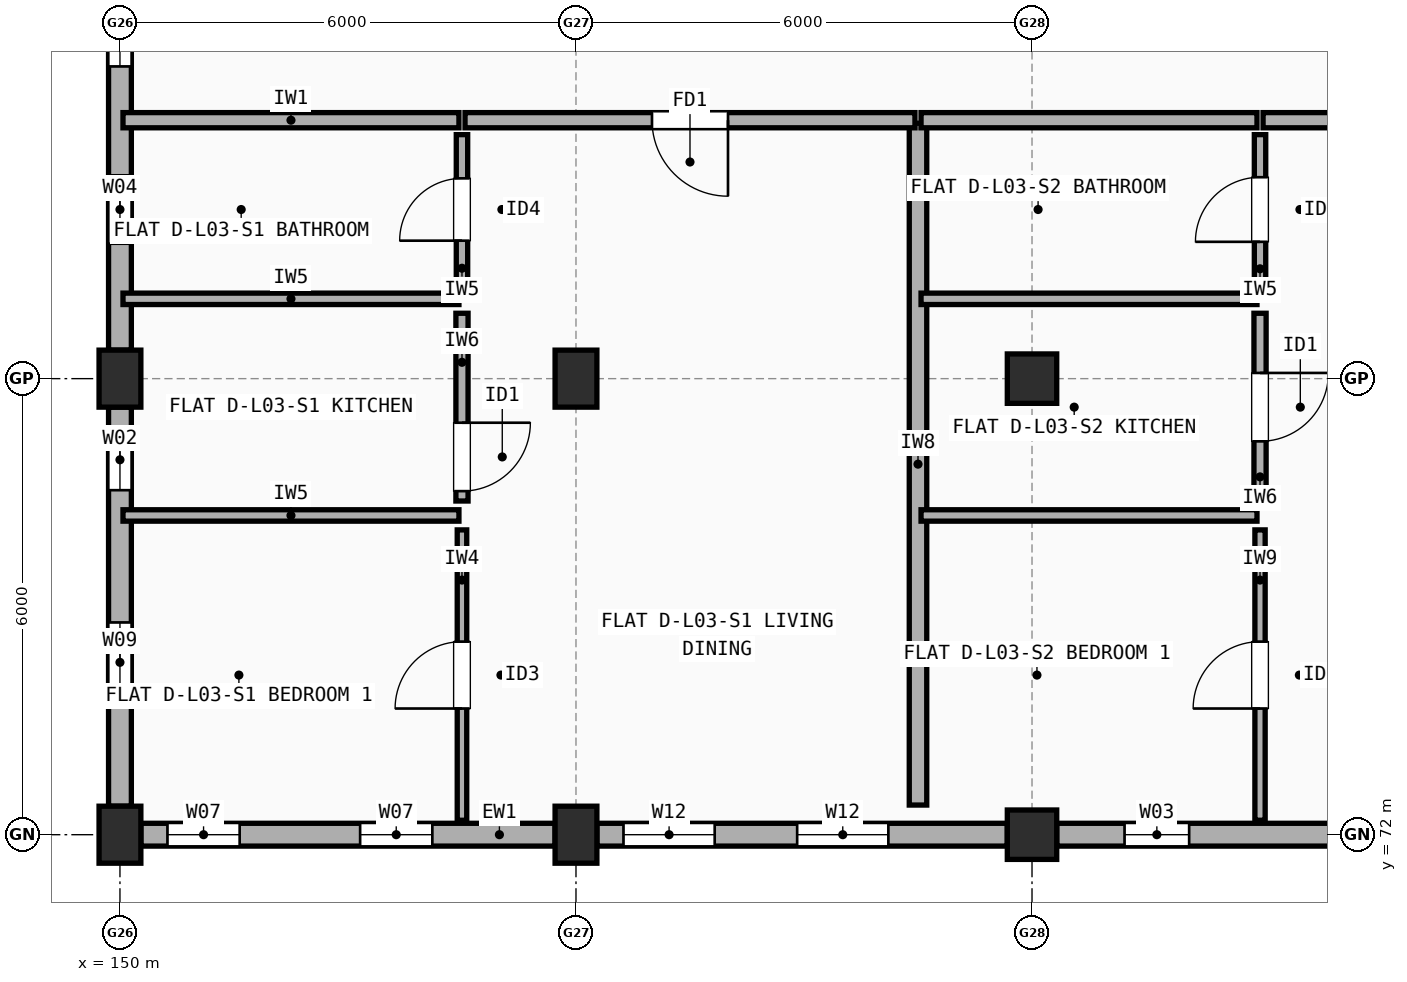
"""IFC4 building model, lengths in metres.
Left out: names, types, materials, properties, quantities, classifications, styles, units other than length and angle.
Written with IfcOpenShell. Run it as: python <this file> out.ifc"""

import sys

from ifc_helpers import new_model, si_unit, direction, frame, frame_2d, origin, origin_2d, place, context, subcontext, project, spatial, rectangle, extrude, element, fill, save


model = new_model("IFC4")
c1 = context("Model", 3, precision=1e-05, world=origin(), true_north=direction((0.0, 1.0)))
c2 = subcontext(c1, "Body", "Model", "MODEL_VIEW")
j1 = project(units=[si_unit("LENGTHUNIT", "METRE"), si_unit("PLANEANGLEUNIT", "RADIAN")], contexts=[c1])
p1 = place(None, origin())
s1 = spatial("IfcSite", under=j1, at=p1, CompositionType="ELEMENT")
p2 = place(p1, origin())
s2 = spatial("IfcBuilding", under=s1, at=p2, CompositionType="ELEMENT")
p3 = place(p2, frame((0.0, 0.0, 10.9)))
s3 = spatial("IfcBuildingStorey", under=s2, at=p3, CompositionType="ELEMENT", Elevation=10.9)
for number, where, z_axis, x_axis in (
    (1, (150.0, 72.0, 0.0), (0.0, 0.0, 1.0), (1.0, 0.0, 0.0)),
    (2, (150.0, 78.0, 0.0), (0.0, 0.0, 1.0), (1.0, 0.0, 0.0)),
    (3, (156.0, 72.0, 0.0), (0.0, 0.0, 1.0), (1.0, 0.0, 0.0)),
    (4, (156.0, 78.0, 0.0), (0.0, 0.0, 1.0), (1.0, 0.0, 0.0)),
):
    element("IfcColumn", number, at=place(p3, frame(where, z_axis=z_axis, x_axis=x_axis)), inside=s3, PredefinedType="COLUMN", context=c2, shape_type="SweptSolid", body=[
        extrude(rectangle(XDim=0.55, YDim=0.75, at=origin_2d()), origin(), (0.0, 0.0, 1.0), 2.96),
    ])
for number, where, z_axis, x_axis in (
    (5, (162.0, 72.0, 0.0), (0.0, 0.0, 1.0), (1.0, 0.0, 0.0)),
    (6, (162.0, 78.0, 0.0), (0.0, 0.0, 1.0), (1.0, 0.0, 0.0)),
):
    element("IfcColumn", number, at=place(p3, frame(where, z_axis=z_axis, x_axis=x_axis)), inside=s3, PredefinedType="COLUMN", context=c2, shape_type="SweptSolid", body=[
        extrude(rectangle(XDim=0.65, YDim=0.65, at=origin_2d()), origin(), (0.0, 0.0, 1.0), 2.96),
    ])
p4 = place(p3, frame((150.275, 72.0, 0.0), z_axis=(0.0, 0.0, 1.0), x_axis=(1.0, 0.0, 0.0)))
e7 = element("IfcWall", 7, at=p4, inside=s3, PredefinedType="STANDARD", context=c2, shape_type="SweptSolid", body=[
    extrude(rectangle(XDim=5.45, YDim=0.3, at=frame_2d((2.725, 0.0))), origin(), (0.0, 0.0, 1.0), 2.442),
])
p5 = place(p4, frame((0.35, 0.0, 0.9)))
e8 = element("IfcOpeningElement", 8, at=p5, cuts=e7, PredefinedType="OPENING", context=c2, shape_type="SweptSolid", body=[
    extrude(rectangle(XDim=0.95, YDim=1.35, at=frame_2d((0.475, 0.675))), frame((0.0, 0.16, 0.0), z_axis=(0.0, -1.0, 0.0), x_axis=(1.0, 0.0, 0.0)), (0.0, 0.0, 1.0), 0.32),
])
p6 = place(p4, frame((2.885, 0.0, 0.9)))
e9 = element("IfcOpeningElement", 9, at=p6, cuts=e7, PredefinedType="OPENING", context=c2, shape_type="SweptSolid", body=[
    extrude(rectangle(XDim=0.95, YDim=1.35, at=frame_2d((0.475, 0.675))), frame((0.0, 0.16, 0.0), z_axis=(0.0, -1.0, 0.0), x_axis=(1.0, 0.0, 0.0)), (0.0, 0.0, 1.0), 0.32),
])
p7 = place(p3, frame((156.275, 72.0, 0.0), z_axis=(0.0, 0.0, 1.0), x_axis=(1.0, 0.0, 0.0)))
e10 = element("IfcWall", 10, at=p7, inside=s3, PredefinedType="STANDARD", context=c2, shape_type="SweptSolid", body=[
    extrude(rectangle(XDim=5.4, YDim=0.3, at=frame_2d((2.7, 0.0))), origin(), (0.0, 0.0, 1.0), 2.442),
])
p8 = place(p7, frame((0.35, 0.0, 0.9)))
e11 = element("IfcOpeningElement", 11, at=p8, cuts=e10, PredefinedType="OPENING", context=c2, shape_type="SweptSolid", body=[
    extrude(rectangle(XDim=1.2, YDim=1.35, at=frame_2d((0.6, 0.675))), frame((0.0, 0.16, 0.0), z_axis=(0.0, -1.0, 0.0), x_axis=(1.0, 0.0, 0.0)), (0.0, 0.0, 1.0), 0.32),
])
p9 = place(p7, frame((2.635, 0.0, 0.9)))
e12 = element("IfcOpeningElement", 12, at=p9, cuts=e10, PredefinedType="OPENING", context=c2, shape_type="SweptSolid", body=[
    extrude(rectangle(XDim=1.2, YDim=1.35, at=frame_2d((0.6, 0.675))), frame((0.0, 0.16, 0.0), z_axis=(0.0, -1.0, 0.0), x_axis=(1.0, 0.0, 0.0)), (0.0, 0.0, 1.0), 0.32),
])
p10 = place(p3, frame((162.325, 72.0, 0.0), z_axis=(0.0, 0.0, 1.0), x_axis=(1.0, 0.0, 0.0)))
e13 = element("IfcWall", 13, at=p10, inside=s3, PredefinedType="STANDARD", context=c2, shape_type="SweptSolid", body=[
    extrude(rectangle(XDim=5.35, YDim=0.3, at=frame_2d((2.675, 0.0))), origin(), (0.0, 0.0, 1.0), 2.442),
])
p11 = place(p10, frame((0.893, 0.0, 0.9)))
e14 = element("IfcOpeningElement", 14, at=p11, cuts=e13, PredefinedType="OPENING", context=c2, shape_type="SweptSolid", body=[
    extrude(rectangle(XDim=0.85, YDim=1.25, at=frame_2d((0.425, 0.625))), frame((0.0, 0.16, 0.0), z_axis=(0.0, -1.0, 0.0), x_axis=(1.0, 0.0, 0.0)), (0.0, 0.0, 1.0), 0.32),
])
p12 = place(p10, frame((3.583, 0.0, 0.9)))
e15 = element("IfcOpeningElement", 15, at=p12, cuts=e13, PredefinedType="OPENING", context=c2, shape_type="SweptSolid", body=[
    extrude(rectangle(XDim=0.9, YDim=1.3, at=frame_2d((0.45, 0.65))), frame((0.0, 0.16, 0.0), z_axis=(0.0, -1.0, 0.0), x_axis=(1.0, 0.0, 0.0)), (0.0, 0.0, 1.0), 0.32),
])
p13 = place(p3, frame((150.0, 83.625, 0.0), z_axis=(0.0, 0.0, 1.0), x_axis=(0.0, -1.0, 0.0)))
e16 = element("IfcWall", 16, at=p13, inside=s3, PredefinedType="STANDARD", context=c2, shape_type="SweptSolid", body=[
    extrude(rectangle(XDim=5.25, YDim=0.3, at=frame_2d((2.625, 0.0))), origin(), (0.0, 0.0, 1.0), 2.442),
])
p14 = place(p13, frame((0.667, 0.0, 0.9)))
e17 = element("IfcOpeningElement", 17, at=p14, cuts=e16, PredefinedType="OPENING", context=c2, shape_type="SweptSolid", body=[
    extrude(rectangle(XDim=0.85, YDim=1.25, at=frame_2d((0.425, 0.625))), frame((0.0, 0.16, 0.0), z_axis=(0.0, -1.0, 0.0), x_axis=(1.0, 0.0, 0.0)), (0.0, 0.0, 1.0), 0.32),
])
p15 = place(p13, frame((2.95, 0.0, 0.9)))
e18 = element("IfcOpeningElement", 18, at=p15, cuts=e16, PredefinedType="OPENING", context=c2, shape_type="SweptSolid", body=[
    extrude(rectangle(XDim=0.9, YDim=1.3, at=frame_2d((0.45, 0.65))), frame((0.0, 0.16, 0.0), z_axis=(0.0, -1.0, 0.0), x_axis=(1.0, 0.0, 0.0)), (0.0, 0.0, 1.0), 0.32),
])
p16 = place(p3, frame((150.0, 77.625, 0.0), z_axis=(0.0, 0.0, 1.0), x_axis=(0.0, -1.0, 0.0)))
e19 = element("IfcWall", 19, at=p16, inside=s3, PredefinedType="STANDARD", context=c2, shape_type="SweptSolid", body=[
    extrude(rectangle(XDim=5.25, YDim=0.3, at=frame_2d((2.625, 0.0))), origin(), (0.0, 0.0, 1.0), 2.442),
])
p17 = place(p16, frame((0.292, 0.0, 0.9)))
e20 = element("IfcOpeningElement", 20, at=p17, cuts=e19, PredefinedType="OPENING", context=c2, shape_type="SweptSolid", body=[
    extrude(rectangle(XDim=0.8, YDim=1.2, at=frame_2d((0.4, 0.6))), frame((0.0, 0.16, 0.0), z_axis=(0.0, -1.0, 0.0), x_axis=(1.0, 0.0, 0.0)), (0.0, 0.0, 1.0), 0.32),
])
p18 = place(p16, frame((2.833, 0.0, 0.9)))
e21 = element("IfcOpeningElement", 21, at=p18, cuts=e19, PredefinedType="OPENING", context=c2, shape_type="SweptSolid", body=[
    extrude(rectangle(XDim=1.05, YDim=1.35, at=frame_2d((0.525, 0.675))), frame((0.0, 0.16, 0.0), z_axis=(0.0, -1.0, 0.0), x_axis=(1.0, 0.0, 0.0)), (0.0, 0.0, 1.0), 0.32),
])
p19 = place(p3, frame((160.5, 72.39, 0.0), z_axis=(0.0, 0.0, 1.0), x_axis=(0.0, 1.0, 0.0)))
e22 = element("IfcWall", 22, at=p19, inside=s3, PredefinedType="SOLIDWALL", context=c2, shape_type="SweptSolid", body=[
    extrude(rectangle(XDim=8.97, YDim=0.23, at=frame_2d((4.485, 0.0))), origin(), (0.0, 0.0, 1.0), 2.442),
])
p20 = place(p3, frame((150.04, 81.4, 0.0), z_axis=(0.0, 0.0, 1.0), x_axis=(1.0, 0.0, 0.0)))
e23 = element("IfcWall", 23, at=p20, inside=s3, PredefinedType="SOLIDWALL", context=c2, shape_type="SweptSolid", body=[
    extrude(rectangle(XDim=4.42, YDim=0.2, at=frame_2d((2.21, 0.0))), origin(), (0.0, 0.0, 1.0), 2.442),
])
p21 = place(p3, frame((154.54, 81.4, 0.0), z_axis=(0.0, 0.0, 1.0), x_axis=(1.0, 0.0, 0.0)))
e24 = element("IfcWall", 24, at=p21, inside=s3, PredefinedType="SOLIDWALL", context=c2, shape_type="SweptSolid", body=[
    extrude(rectangle(XDim=5.92, YDim=0.2, at=frame_2d((2.96, 0.0))), origin(), (0.0, 0.0, 1.0), 2.442),
])
p22 = place(p21, frame((2.46, 0.0, 0.0)))
e25 = element("IfcOpeningElement", 25, at=p22, cuts=e24, PredefinedType="OPENING", context=c2, shape_type="SweptSolid", body=[
    extrude(rectangle(XDim=1.0, YDim=2.15, at=frame_2d((0.5, 1.075))), frame((0.0, 0.11, 0.0), z_axis=(0.0, -1.0, 0.0), x_axis=(1.0, 0.0, 0.0)), (0.0, 0.0, 1.0), 0.22),
])
p23 = place(p3, frame((154.5, 72.19, 0.0), z_axis=(0.0, 0.0, 1.0), x_axis=(0.0, 1.0, 0.0)))
e26 = element("IfcWall", 26, at=p23, inside=s3, PredefinedType="PARTITIONING", context=c2, shape_type="SweptSolid", body=[
    extrude(rectangle(XDim=3.82, YDim=0.125, at=frame_2d((1.91, 0.0))), origin(), (0.0, 0.0, 1.0), 2.96),
])
p24 = place(p23, frame((1.47, 0.0, 0.0)))
e27 = element("IfcOpeningElement", 27, at=p24, cuts=e26, PredefinedType="OPENING", context=c2, shape_type="SweptSolid", body=[
    extrude(rectangle(XDim=0.88, YDim=2.1, at=frame_2d((0.44, 1.05))), frame((0.0, 0.073, 0.0), z_axis=(0.0, -1.0, 0.0), x_axis=(1.0, 0.0, 0.0)), (0.0, 0.0, 1.0), 0.145),
])
p25 = place(p3, frame((154.5, 76.39, 0.0), z_axis=(0.0, 0.0, 1.0), x_axis=(0.0, 1.0, 0.0)))
e28 = element("IfcWall", 28, at=p25, inside=s3, PredefinedType="PLUMBINGWALL", context=c2, shape_type="SweptSolid", body=[
    extrude(rectangle(XDim=2.47, YDim=0.16, at=frame_2d((1.235, 0.0))), origin(), (0.0, 0.0, 1.0), 2.442),
])
p26 = place(p25, frame((0.13, 0.0, 0.0)))
e29 = element("IfcOpeningElement", 29, at=p26, cuts=e28, PredefinedType="OPENING", context=c2, shape_type="SweptSolid", body=[
    extrude(rectangle(XDim=0.9, YDim=2.1, at=frame_2d((0.45, 1.05))), frame((0.0, 0.09, 0.0), z_axis=(0.0, -1.0, 0.0), x_axis=(1.0, 0.0, 0.0)), (0.0, 0.0, 1.0), 0.18),
])
p27 = place(p3, frame((154.5, 79.24, 0.0), z_axis=(0.0, 0.0, 1.0), x_axis=(0.0, 1.0, 0.0)))
e30 = element("IfcWall", 30, at=p27, inside=s3, PredefinedType="PARTITIONING", context=c2, shape_type="SweptSolid", body=[
    extrude(rectangle(XDim=1.97, YDim=0.15, at=frame_2d((0.985, 0.0))), origin(), (0.0, 0.0, 1.0), 2.96),
])
p28 = place(p27, frame((0.575, 0.0, 0.0)))
e31 = element("IfcOpeningElement", 31, at=p28, cuts=e30, PredefinedType="OPENING", context=c2, shape_type="SweptSolid", body=[
    extrude(rectangle(XDim=0.82, YDim=2.08, at=frame_2d((0.41, 1.04))), frame((0.0, 0.085, 0.0), z_axis=(0.0, -1.0, 0.0), x_axis=(1.0, 0.0, 0.0)), (0.0, 0.0, 1.0), 0.17),
])
for number, where, z_axis, x_axis in (
    (32, (150.04, 76.2, 0.0), (0.0, 0.0, 1.0), (1.0, 0.0, 0.0)),
    (33, (150.04, 79.05, 0.0), (0.0, 0.0, 1.0), (1.0, 0.0, 0.0)),
):
    element("IfcWall", number, at=place(p3, frame(where, z_axis=z_axis, x_axis=x_axis)), inside=s3, PredefinedType="PARTITIONING", context=c2, shape_type="SweptSolid", body=[
        extrude(rectangle(XDim=4.42, YDim=0.15, at=frame_2d((2.21, 0.0))), origin(), (0.0, 0.0, 1.0), 2.442),
    ])
p29 = place(p3, frame((160.54, 81.4, 0.0), z_axis=(0.0, 0.0, 1.0), x_axis=(1.0, 0.0, 0.0)))
e34 = element("IfcWall", 34, at=p29, inside=s3, PredefinedType="SOLIDWALL", context=c2, shape_type="SweptSolid", body=[
    extrude(rectangle(XDim=4.42, YDim=0.2, at=frame_2d((2.21, 0.0))), origin(), (0.0, 0.0, 1.0), 2.508),
])
p30 = place(p3, frame((165.04, 81.4, 0.0), z_axis=(0.0, 0.0, 1.0), x_axis=(1.0, 0.0, 0.0)))
e35 = element("IfcWall", 35, at=p30, inside=s3, PredefinedType="SOLIDWALL", context=c2, shape_type="SweptSolid", body=[
    extrude(rectangle(XDim=4.42, YDim=0.2, at=frame_2d((2.21, 0.0))), origin(), (0.0, 0.0, 1.0), 2.458),
])
p31 = place(p30, frame((1.72, 0.0, 0.0)))
e36 = element("IfcOpeningElement", 36, at=p31, cuts=e35, PredefinedType="OPENING", context=c2, shape_type="SweptSolid", body=[
    extrude(rectangle(XDim=0.98, YDim=2.15, at=frame_2d((0.49, 1.075))), frame((0.0, 0.11, 0.0), z_axis=(0.0, -1.0, 0.0), x_axis=(1.0, 0.0, 0.0)), (0.0, 0.0, 1.0), 0.22),
])
p32 = place(p3, frame((165.0, 72.19, 0.0), z_axis=(0.0, 0.0, 1.0), x_axis=(0.0, 1.0, 0.0)))
e37 = element("IfcWall", 37, at=p32, inside=s3, PredefinedType="PARTITIONING", context=c2, shape_type="SweptSolid", body=[
    extrude(rectangle(XDim=3.82, YDim=0.135, at=frame_2d((1.91, 0.0))), origin(), (0.0, 0.0, 1.0), 2.96),
])
p33 = place(p32, frame((1.47, 0.0, 0.0)))
e38 = element("IfcOpeningElement", 38, at=p33, cuts=e37, PredefinedType="OPENING", context=c2, shape_type="SweptSolid", body=[
    extrude(rectangle(XDim=0.88, YDim=2.1, at=frame_2d((0.44, 1.05))), frame((0.0, 0.077, 0.0), z_axis=(0.0, -1.0, 0.0), x_axis=(1.0, 0.0, 0.0)), (0.0, 0.0, 1.0), 0.155),
])
p34 = place(p3, frame((165.0, 76.39, 0.0), z_axis=(0.0, 0.0, 1.0), x_axis=(0.0, 1.0, 0.0)))
e39 = element("IfcWall", 39, at=p34, inside=s3, PredefinedType="PLUMBINGWALL", context=c2, shape_type="SweptSolid", body=[
    extrude(rectangle(XDim=2.47, YDim=0.16, at=frame_2d((1.235, 0.0))), origin(), (0.0, 0.0, 1.0), 2.442),
])
p35 = place(p34, frame((0.785, 0.0, 0.0)))
e40 = element("IfcOpeningElement", 40, at=p35, cuts=e39, PredefinedType="OPENING", context=c2, shape_type="SweptSolid", body=[
    extrude(rectangle(XDim=0.9, YDim=2.1, at=frame_2d((0.45, 1.05))), frame((0.0, 0.09, 0.0), z_axis=(0.0, -1.0, 0.0), x_axis=(1.0, 0.0, 0.0)), (0.0, 0.0, 1.0), 0.18),
])
p36 = place(p3, frame((165.0, 79.24, 0.0), z_axis=(0.0, 0.0, 1.0), x_axis=(0.0, 1.0, 0.0)))
e41 = element("IfcWall", 41, at=p36, inside=s3, PredefinedType="PARTITIONING", context=c2, shape_type="SweptSolid", body=[
    extrude(rectangle(XDim=1.97, YDim=0.15, at=frame_2d((0.985, 0.0))), origin(), (0.0, 0.0, 1.0), 2.96),
])
p37 = place(p36, frame((0.56, 0.0, 0.0)))
e42 = element("IfcOpeningElement", 42, at=p37, cuts=e41, PredefinedType="OPENING", context=c2, shape_type="SweptSolid", body=[
    extrude(rectangle(XDim=0.85, YDim=2.1, at=frame_2d((0.425, 1.05))), frame((0.0, 0.085, 0.0), z_axis=(0.0, -1.0, 0.0), x_axis=(1.0, 0.0, 0.0)), (0.0, 0.0, 1.0), 0.17),
])
p38 = place(p3, frame((160.54, 76.2, 0.0), z_axis=(0.0, 0.0, 1.0), x_axis=(1.0, 0.0, 0.0)))
e43 = element("IfcWall", 43, at=p38, inside=s3, PredefinedType="PARTITIONING", context=c2, shape_type="SweptSolid", body=[
    extrude(rectangle(XDim=4.42, YDim=0.15, at=frame_2d((2.21, 0.0))), origin(), (0.0, 0.0, 1.0), 2.548),
])
p39 = place(p3, frame((160.54, 79.05, 0.0), z_axis=(0.0, 0.0, 1.0), x_axis=(1.0, 0.0, 0.0)))
e44 = element("IfcWall", 44, at=p39, inside=s3, PredefinedType="PARTITIONING", context=c2, shape_type="SweptSolid", body=[
    extrude(rectangle(XDim=4.42, YDim=0.15, at=frame_2d((2.21, 0.0))), origin(), (0.0, 0.0, 1.0), 2.508),
])
p40 = place(p5, origin())
e45 = element("IfcWindow", 45, at=p40, inside=s3, PartitioningType="SINGLE_PANEL", PredefinedType="WINDOW", context=c2, shape_type="SweptSolid", body=[
    extrude(rectangle(XDim=0.95, YDim=1.35, at=frame_2d((0.475, 0.675))), frame((0.0, 0.03, 0.0), z_axis=(0.0, -1.0, 0.0), x_axis=(1.0, 0.0, 0.0)), (0.0, 0.0, 1.0), 0.06),
])
fill(e8, e45)
p41 = place(p6, origin())
e46 = element("IfcWindow", 46, at=p41, inside=s3, PartitioningType="SINGLE_PANEL", PredefinedType="WINDOW", context=c2, shape_type="SweptSolid", body=[
    extrude(rectangle(XDim=0.95, YDim=1.35, at=frame_2d((0.475, 0.675))), frame((0.0, 0.03, 0.0), z_axis=(0.0, -1.0, 0.0), x_axis=(1.0, 0.0, 0.0)), (0.0, 0.0, 1.0), 0.06),
])
fill(e9, e46)
p42 = place(p8, origin())
e47 = element("IfcWindow", 47, at=p42, inside=s3, PartitioningType="SINGLE_PANEL", PredefinedType="WINDOW", context=c2, shape_type="SweptSolid", body=[
    extrude(rectangle(XDim=1.2, YDim=1.35, at=frame_2d((0.6, 0.675))), frame((0.0, 0.03, 0.0), z_axis=(0.0, -1.0, 0.0), x_axis=(1.0, 0.0, 0.0)), (0.0, 0.0, 1.0), 0.06),
])
fill(e11, e47)
p43 = place(p9, origin())
e48 = element("IfcWindow", 48, at=p43, inside=s3, PartitioningType="SINGLE_PANEL", PredefinedType="WINDOW", context=c2, shape_type="SweptSolid", body=[
    extrude(rectangle(XDim=1.2, YDim=1.35, at=frame_2d((0.6, 0.675))), frame((0.0, 0.03, 0.0), z_axis=(0.0, -1.0, 0.0), x_axis=(1.0, 0.0, 0.0)), (0.0, 0.0, 1.0), 0.06),
])
fill(e12, e48)
p44 = place(p11, origin())
e49 = element("IfcWindow", 49, at=p44, inside=s3, PartitioningType="SINGLE_PANEL", PredefinedType="WINDOW", context=c2, shape_type="SweptSolid", body=[
    extrude(rectangle(XDim=0.85, YDim=1.25, at=frame_2d((0.425, 0.625))), frame((0.0, 0.03, 0.0), z_axis=(0.0, -1.0, 0.0), x_axis=(1.0, 0.0, 0.0)), (0.0, 0.0, 1.0), 0.06),
])
fill(e14, e49)
p45 = place(p14, origin())
e50 = element("IfcWindow", 50, at=p45, inside=s3, PartitioningType="SINGLE_PANEL", PredefinedType="WINDOW", context=c2, shape_type="SweptSolid", body=[
    extrude(rectangle(XDim=0.85, YDim=1.25, at=frame_2d((0.425, 0.625))), frame((0.0, 0.03, 0.0), z_axis=(0.0, -1.0, 0.0), x_axis=(1.0, 0.0, 0.0)), (0.0, 0.0, 1.0), 0.06),
])
fill(e17, e50)
p46 = place(p15, origin())
e51 = element("IfcWindow", 51, at=p46, inside=s3, PartitioningType="SINGLE_PANEL", PredefinedType="WINDOW", context=c2, shape_type="SweptSolid", body=[
    extrude(rectangle(XDim=0.9, YDim=1.3, at=frame_2d((0.45, 0.65))), frame((0.0, 0.03, 0.0), z_axis=(0.0, -1.0, 0.0), x_axis=(1.0, 0.0, 0.0)), (0.0, 0.0, 1.0), 0.06),
])
fill(e18, e51)
p47 = place(p17, origin())
e52 = element("IfcWindow", 52, at=p47, inside=s3, PartitioningType="SINGLE_PANEL", PredefinedType="WINDOW", context=c2, shape_type="SweptSolid", body=[
    extrude(rectangle(XDim=0.8, YDim=1.2, at=frame_2d((0.4, 0.6))), frame((0.0, 0.03, 0.0), z_axis=(0.0, -1.0, 0.0), x_axis=(1.0, 0.0, 0.0)), (0.0, 0.0, 1.0), 0.06),
])
fill(e20, e52)
p48 = place(p18, origin())
e53 = element("IfcWindow", 53, at=p48, inside=s3, PartitioningType="SINGLE_PANEL", PredefinedType="WINDOW", context=c2, shape_type="SweptSolid", body=[
    extrude(rectangle(XDim=1.05, YDim=1.35, at=frame_2d((0.525, 0.675))), frame((0.0, 0.03, 0.0), z_axis=(0.0, -1.0, 0.0), x_axis=(1.0, 0.0, 0.0)), (0.0, 0.0, 1.0), 0.06),
])
fill(e21, e53)
p49 = place(p22, origin())
e54 = element("IfcDoor", 54, at=p49, inside=s3, OperationType="SINGLE_SWING_RIGHT", PredefinedType="DOOR", context=c2, shape_type="SweptSolid", body=[
    extrude(rectangle(XDim=1.0, YDim=2.15, at=frame_2d((0.5, 1.075))), frame((0.0, 0.025, 0.0), z_axis=(0.0, -1.0, 0.0), x_axis=(1.0, 0.0, 0.0)), (0.0, 0.0, 1.0), 0.05),
])
fill(e25, e54)
p50 = place(p24, origin())
e55 = element("IfcDoor", 55, at=p50, inside=s3, OperationType="SINGLE_SWING_LEFT", PredefinedType="DOOR", context=c2, shape_type="SweptSolid", body=[
    extrude(rectangle(XDim=0.88, YDim=2.1, at=frame_2d((0.44, 1.05))), frame((0.0, 0.025, 0.0), z_axis=(0.0, -1.0, 0.0), x_axis=(1.0, 0.0, 0.0)), (0.0, 0.0, 1.0), 0.05),
])
fill(e27, e55)
p51 = place(p26, origin())
e56 = element("IfcDoor", 56, at=p51, inside=s3, OperationType="SINGLE_SWING_RIGHT", PredefinedType="DOOR", context=c2, shape_type="SweptSolid", body=[
    extrude(rectangle(XDim=0.9, YDim=2.1, at=frame_2d((0.45, 1.05))), frame((0.0, 0.025, 0.0), z_axis=(0.0, -1.0, 0.0), x_axis=(1.0, 0.0, 0.0)), (0.0, 0.0, 1.0), 0.05),
])
fill(e29, e56)
p52 = place(p28, origin())
e57 = element("IfcDoor", 57, at=p52, inside=s3, OperationType="SINGLE_SWING_LEFT", PredefinedType="DOOR", context=c2, shape_type="SweptSolid", body=[
    extrude(rectangle(XDim=0.82, YDim=2.08, at=frame_2d((0.41, 1.04))), frame((0.0, 0.025, 0.0), z_axis=(0.0, -1.0, 0.0), x_axis=(1.0, 0.0, 0.0)), (0.0, 0.0, 1.0), 0.05),
])
fill(e31, e57)
p53 = place(p33, origin())
e58 = element("IfcDoor", 58, at=p53, inside=s3, OperationType="SINGLE_SWING_LEFT", PredefinedType="DOOR", context=c2, shape_type="SweptSolid", body=[
    extrude(rectangle(XDim=0.88, YDim=2.1, at=frame_2d((0.44, 1.05))), frame((0.0, 0.025, 0.0), z_axis=(0.0, -1.0, 0.0), x_axis=(1.0, 0.0, 0.0)), (0.0, 0.0, 1.0), 0.05),
])
fill(e38, e58)
p54 = place(p35, origin())
e59 = element("IfcDoor", 59, at=p54, inside=s3, OperationType="SINGLE_SWING_RIGHT", PredefinedType="DOOR", context=c2, shape_type="SweptSolid", body=[
    extrude(rectangle(XDim=0.9, YDim=2.1, at=frame_2d((0.45, 1.05))), frame((0.0, 0.025, 0.0), z_axis=(0.0, -1.0, 0.0), x_axis=(1.0, 0.0, 0.0)), (0.0, 0.0, 1.0), 0.05),
])
fill(e40, e59)
p55 = place(p37, origin())
e60 = element("IfcDoor", 60, at=p55, inside=s3, OperationType="SINGLE_SWING_LEFT", PredefinedType="DOOR", context=c2, shape_type="SweptSolid", body=[
    extrude(rectangle(XDim=0.85, YDim=2.1, at=frame_2d((0.425, 1.05))), frame((0.0, 0.025, 0.0), z_axis=(0.0, -1.0, 0.0), x_axis=(1.0, 0.0, 0.0)), (0.0, 0.0, 1.0), 0.05),
])
fill(e42, e60)
save(model, sys.argv[1])
